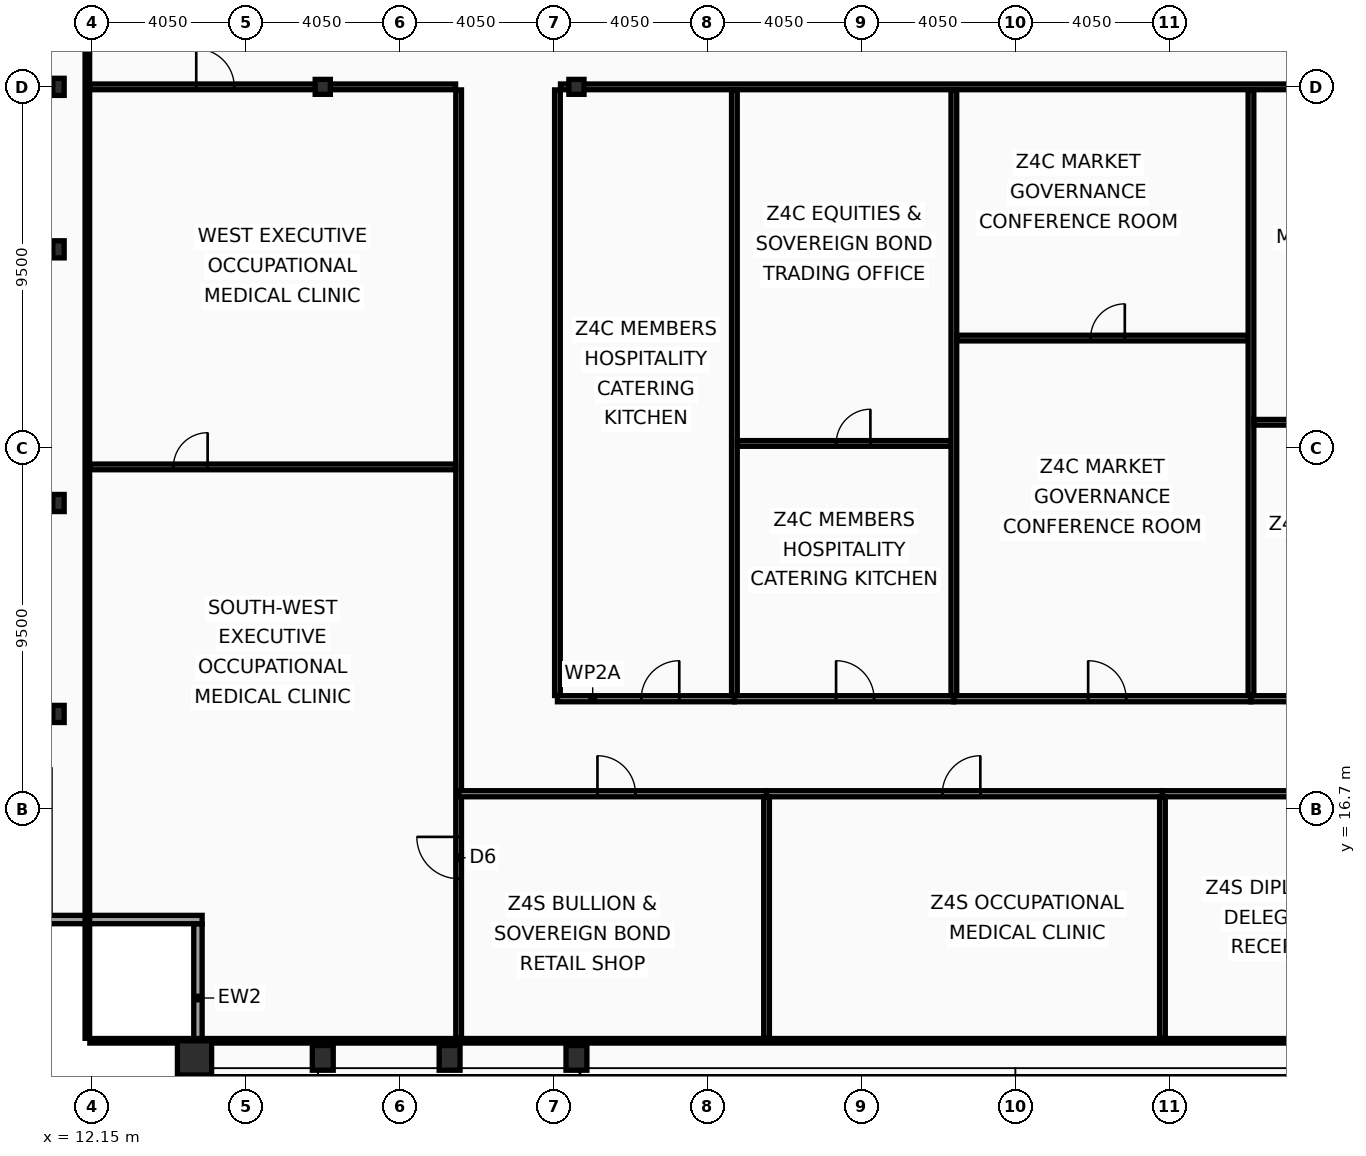
"""IFC4 building model, lengths in metres.
Left out: names, types, materials, properties, quantities, classifications, styles, units other than length and angle.
Written with IfcOpenShell. Run it as: python <this file> out.ifc"""

import sys

from ifc_helpers import new_model, si_unit, direction, frame, frame_2d, origin, origin_2d, place, context, subcontext, project, spatial, rectangle, hollow_rectangle, i_section, extrude, element, fill, save


model = new_model("IFC4")
c1 = context("Model", 3, precision=1e-05, world=origin(), true_north=direction((0.0, 1.0)))
c2 = subcontext(c1, "Body", "Model", "MODEL_VIEW")
j1 = project(units=[si_unit("LENGTHUNIT", "METRE"), si_unit("PLANEANGLEUNIT", "RADIAN")], contexts=[c1])
p1 = place(None, origin())
s1 = spatial("IfcSite", under=j1, at=p1, CompositionType="ELEMENT")
p2 = place(p1, origin())
s2 = spatial("IfcBuilding", under=s1, at=p2, CompositionType="ELEMENT")
p3 = place(p2, frame((0.0, 0.0, 314.6)))
s3 = spatial("IfcBuildingStorey", under=s2, at=p3, CompositionType="ELEMENT", Elevation=314.6)
p4 = place(p3, frame((14.85, 10.15, 0.0), z_axis=(0.0, 0.0, 1.0), x_axis=(1.0, 0.0, 0.0)))
e1 = element("IfcColumn", 1, at=p4, inside=s3, PredefinedType="COLUMN", context=c2, shape_type="SweptSolid", body=[
    extrude(hollow_rectangle(XDim=0.9, YDim=0.9, WallThickness=0.05, at=origin_2d()), origin(), (0.0, 0.0, 1.0), 3.6),
])
for number, where, z_axis, x_axis in (
    (2, (18.225, 10.15, 0.0), (0.0, 0.0, 1.0), (1.0, 0.0, 0.0)),
    (3, (21.562, 10.15, 0.0), (0.0, 0.0, 1.0), (1.0, 0.0, 0.0)),
    (4, (24.9, 10.15, 0.0), (0.0, 0.0, 1.0), (1.0, 0.0, 0.0)),
):
    element("IfcColumn", number, at=place(p3, frame(where, z_axis=z_axis, x_axis=x_axis)), inside=s3, PredefinedType="COLUMN", context=c2, shape_type="SweptSolid", body=[
        extrude(hollow_rectangle(XDim=0.55, YDim=0.65, WallThickness=0.04, at=origin_2d()), origin(), (0.0, 0.0, 1.0), 3.6),
    ])
for number, where, z_axis, x_axis in (
    (5, (11.27, 19.2, 0.0), (0.0, 0.0, 1.0), (1.0, 0.0, 0.0)),
    (6, (11.27, 24.75, 0.0), (0.0, 0.0, 1.0), (1.0, 0.0, 0.0)),
    (7, (11.27, 31.425, 0.0), (0.0, 0.0, 1.0), (1.0, 0.0, 0.0)),
    (8, (11.27, 35.7, 0.0), (0.0, 0.0, 1.0), (1.0, 0.0, 0.0)),
):
    element("IfcColumn", number, at=place(p3, frame(where, z_axis=z_axis, x_axis=x_axis)), inside=s3, PredefinedType="COLUMN", context=c2, shape_type="SweptSolid", body=[
        extrude(i_section(OverallWidth=0.3, OverallDepth=0.45, WebThickness=0.014, FlangeThickness=0.026, at=origin_2d()), origin(), (0.0, 0.0, 1.0), 3.6),
    ])
for number, where, z_axis, x_axis in (
    (9, (18.225, 35.7, 0.0), (0.0, 0.0, 1.0), (1.0, 0.0, 0.0)),
    (10, (24.9, 35.7, 0.0), (0.0, 0.0, 1.0), (1.0, 0.0, 0.0)),
):
    element("IfcColumn", number, at=place(p3, frame(where, z_axis=z_axis, x_axis=x_axis)), inside=s3, PredefinedType="COLUMN", context=c2, shape_type="SweptSolid", body=[
        extrude(i_section(OverallWidth=0.399, OverallDepth=0.393, WebThickness=0.023, FlangeThickness=0.037, at=origin_2d()), origin(), (0.0, 0.0, 1.0), 3.6),
    ])
p5 = place(p3, frame((14.94, 9.77, 0.0), z_axis=(0.0, 0.0, 1.0), x_axis=(0.0, 1.0, 0.0)))
e11 = element("IfcWall", 11, at=p5, inside=s3, PredefinedType="SOLIDWALL", context=c2, shape_type="SweptSolid", body=[
    extrude(rectangle(XDim=3.91, YDim=0.22, at=frame_2d((1.955, 0.0))), origin(), (0.0, 0.0, 1.0), 2.88),
])
p6 = place(p3, frame((15.05, 13.79, 0.0), z_axis=(0.0, 0.0, 1.0), x_axis=(-1.0, 0.0, 0.0)))
e12 = element("IfcWall", 12, at=p6, inside=s3, PredefinedType="SOLIDWALL", context=c2, shape_type="SweptSolid", body=[
    extrude(rectangle(XDim=4.22, YDim=0.22, at=frame_2d((2.11, 0.0))), origin(), (0.0, 0.0, 1.0), 2.88),
])
p7 = place(p3, frame((21.8, 10.665, 0.0), z_axis=(0.0, 0.0, 1.0), x_axis=(0.0, 1.0, 0.0)))
e13 = element("IfcWall", 13, at=p7, inside=s3, PredefinedType="PARTITIONING", context=c2, shape_type="SweptSolid", body=[
    extrude(rectangle(XDim=24.955, YDim=0.15, at=frame_2d((12.478, 0.0))), origin(), (0.0, 0.0, 1.0), 3.07),
])
p8 = place(p7, frame((4.2, 0.0, 0.0)))
e14 = element("IfcOpeningElement", 14, at=p8, cuts=e13, PredefinedType="OPENING", context=c2, shape_type="SweptSolid", body=[
    extrude(rectangle(XDim=1.1, YDim=2.1, at=frame_2d((0.55, 1.05))), frame((0.0, 0.085, 0.0), z_axis=(0.0, -1.0, 0.0), x_axis=(1.0, 0.0, 0.0)), (0.0, 0.0, 1.0), 0.17),
])
p9 = place(p3, frame((12.095, 35.7, 0.0), z_axis=(0.0, 0.0, 1.0), x_axis=(1.0, 0.0, 0.0)))
e15 = element("IfcWall", 15, at=p9, inside=s3, PredefinedType="PARTITIONING", context=c2, shape_type="SweptSolid", body=[
    extrude(rectangle(XDim=9.625, YDim=0.15, at=frame_2d((4.812, 0.0))), origin(), (0.0, 0.0, 1.0), 2.83),
])
p10 = place(p9, frame((2.8, 0.0, 0.0)))
e16 = element("IfcOpeningElement", 16, at=p10, cuts=e15, PredefinedType="OPENING", context=c2, shape_type="SweptSolid", body=[
    extrude(rectangle(XDim=1.0, YDim=2.05, at=frame_2d((0.5, 1.025))), frame((0.0, 0.085, 0.0), z_axis=(0.0, -1.0, 0.0), x_axis=(1.0, 0.0, 0.0)), (0.0, 0.0, 1.0), 0.17),
])
p11 = place(p3, frame((12.095, 25.7, 0.0), z_axis=(0.0, 0.0, 1.0), x_axis=(1.0, 0.0, 0.0)))
e17 = element("IfcWall", 17, at=p11, inside=s3, PredefinedType="PARTITIONING", context=c2, shape_type="SweptSolid", body=[
    extrude(rectangle(XDim=9.625, YDim=0.15, at=frame_2d((4.812, 0.0))), origin(), (0.0, 0.0, 1.0), 2.83),
])
p12 = place(p11, frame((2.2, 0.0, 0.0)))
e18 = element("IfcOpeningElement", 18, at=p12, cuts=e17, PredefinedType="OPENING", context=c2, shape_type="SweptSolid", body=[
    extrude(rectangle(XDim=0.9, YDim=2.05, at=frame_2d((0.45, 1.025))), frame((0.0, 0.085, 0.0), z_axis=(0.0, -1.0, 0.0), x_axis=(1.0, 0.0, 0.0)), (0.0, 0.0, 1.0), 0.17),
])
p13 = place(p3, frame((24.4, 19.685, 0.0), z_axis=(0.0, 0.0, 1.0), x_axis=(0.0, 1.0, 0.0)))
e19 = element("IfcWall", 19, at=p13, inside=s3, PredefinedType="PARTITIONING", context=c2, shape_type="SweptSolid", body=[
    extrude(rectangle(XDim=15.935, YDim=0.15, at=frame_2d((7.968, 0.0))), origin(), (0.0, 0.0, 1.0), 2.83),
])
p14 = place(p3, frame((24.48, 35.7, 0.0), z_axis=(0.0, 0.0, 1.0), x_axis=(1.0, 0.0, 0.0)))
e20 = element("IfcWall", 20, at=p14, inside=s3, PredefinedType="PARTITIONING", context=c2, shape_type="SweptSolid", body=[
    extrude(rectangle(XDim=25.02, YDim=0.15, at=frame_2d((12.51, 0.0))), origin(), (0.0, 0.0, 1.0), 2.83),
])
p15 = place(p3, frame((24.4, 19.6, 0.0), z_axis=(0.0, 0.0, 1.0), x_axis=(1.0, 0.0, 0.0)))
e21 = element("IfcWall", 21, at=p15, inside=s3, PredefinedType="PARTITIONING", context=c2, shape_type="SweptSolid", body=[
    extrude(rectangle(XDim=4.656, YDim=0.16, at=frame_2d((2.328, 0.0))), origin(), (0.0, 0.0, 1.0), 2.83),
])
p16 = place(p15, frame((2.206, 0.0, 0.0)))
e22 = element("IfcOpeningElement", 22, at=p16, cuts=e21, PredefinedType="OPENING", context=c2, shape_type="SweptSolid", body=[
    extrude(rectangle(XDim=1.0, YDim=2.05, at=frame_2d((0.5, 1.025))), frame((0.0, 0.09, 0.0), z_axis=(0.0, -1.0, 0.0), x_axis=(1.0, 0.0, 0.0)), (0.0, 0.0, 1.0), 0.18),
])
p17 = place(p3, frame((29.056, 19.6, 0.0), z_axis=(0.0, 0.0, 1.0), x_axis=(1.0, 0.0, 0.0)))
e23 = element("IfcWall", 23, at=p17, inside=s3, PredefinedType="PARTITIONING", context=c2, shape_type="SweptSolid", body=[
    extrude(rectangle(XDim=5.775, YDim=0.16, at=frame_2d((2.888, 0.0))), origin(), (0.0, 0.0, 1.0), 3.44),
])
p18 = place(p17, frame((2.676, 0.0, 0.0)))
e24 = element("IfcOpeningElement", 24, at=p18, cuts=e23, PredefinedType="OPENING", context=c2, shape_type="SweptSolid", body=[
    extrude(rectangle(XDim=1.0, YDim=2.05, at=frame_2d((0.5, 1.025))), frame((0.0, 0.09, 0.0), z_axis=(0.0, -1.0, 0.0), x_axis=(1.0, 0.0, 0.0)), (0.0, 0.0, 1.0), 0.18),
])
p19 = place(p3, frame((29.056, 19.685, 0.0), z_axis=(0.0, 0.0, 1.0), x_axis=(0.0, 1.0, 0.0)))
e25 = element("IfcWall", 25, at=p19, inside=s3, PredefinedType="PARTITIONING", context=c2, shape_type="SweptSolid", body=[
    extrude(rectangle(XDim=15.935, YDim=0.15, at=frame_2d((7.968, 0.0))), origin(), (0.0, 0.0, 1.0), 3.07),
])
p20 = place(p3, frame((29.136, 26.317, 0.0), z_axis=(0.0, 0.0, 1.0), x_axis=(1.0, 0.0, 0.0)))
e26 = element("IfcWall", 26, at=p20, inside=s3, PredefinedType="PARTITIONING", context=c2, shape_type="SweptSolid", body=[
    extrude(rectangle(XDim=5.615, YDim=0.15, at=frame_2d((2.808, 0.0))), origin(), (0.0, 0.0, 1.0), 3.44),
])
p21 = place(p20, frame((2.599, 0.0, 0.0)))
e27 = element("IfcOpeningElement", 27, at=p21, cuts=e26, PredefinedType="OPENING", context=c2, shape_type="SweptSolid", body=[
    extrude(rectangle(XDim=0.9, YDim=2.05, at=frame_2d((0.45, 1.025))), frame((0.0, 0.085, 0.0), z_axis=(0.0, -1.0, 0.0), x_axis=(1.0, 0.0, 0.0)), (0.0, 0.0, 1.0), 0.17),
])
p22 = place(p3, frame((34.832, 19.6, 0.0), z_axis=(0.0, 0.0, 1.0), x_axis=(1.0, 0.0, 0.0)))
e28 = element("IfcWall", 28, at=p22, inside=s3, PredefinedType="PARTITIONING", context=c2, shape_type="SweptSolid", body=[
    extrude(rectangle(XDim=7.818, YDim=0.16, at=frame_2d((3.909, 0.0))), origin(), (0.0, 0.0, 1.0), 3.44),
])
p23 = place(p22, frame((3.534, 0.0, 0.0)))
e29 = element("IfcOpeningElement", 29, at=p23, cuts=e28, PredefinedType="OPENING", context=c2, shape_type="SweptSolid", body=[
    extrude(rectangle(XDim=1.0, YDim=2.05, at=frame_2d((0.5, 1.025))), frame((0.0, 0.09, 0.0), z_axis=(0.0, -1.0, 0.0), x_axis=(1.0, 0.0, 0.0)), (0.0, 0.0, 1.0), 0.18),
])
p24 = place(p3, frame((34.832, 19.685, 0.0), z_axis=(0.0, 0.0, 1.0), x_axis=(0.0, 1.0, 0.0)))
e30 = element("IfcWall", 30, at=p24, inside=s3, PredefinedType="PARTITIONING", context=c2, shape_type="SweptSolid", body=[
    extrude(rectangle(XDim=15.935, YDim=0.15, at=frame_2d((7.968, 0.0))), origin(), (0.0, 0.0, 1.0), 3.07),
])
p25 = place(p3, frame((34.912, 29.09, 0.0), z_axis=(0.0, 0.0, 1.0), x_axis=(1.0, 0.0, 0.0)))
e31 = element("IfcWall", 31, at=p25, inside=s3, PredefinedType="PARTITIONING", context=c2, shape_type="SweptSolid", body=[
    extrude(rectangle(XDim=7.658, YDim=0.15, at=frame_2d((3.829, 0.0))), origin(), (0.0, 0.0, 1.0), 3.44),
])
p26 = place(p25, frame((3.518, 0.0, 0.0)))
e32 = element("IfcOpeningElement", 32, at=p26, cuts=e31, PredefinedType="OPENING", context=c2, shape_type="SweptSolid", body=[
    extrude(rectangle(XDim=0.9, YDim=2.05, at=frame_2d((0.45, 1.025))), frame((0.0, 0.085, 0.0), z_axis=(0.0, -1.0, 0.0), x_axis=(1.0, 0.0, 0.0)), (0.0, 0.0, 1.0), 0.17),
])
p27 = place(p3, frame((42.65, 19.6, 0.0), z_axis=(0.0, 0.0, 1.0), x_axis=(1.0, 0.0, 0.0)))
e33 = element("IfcWall", 33, at=p27, inside=s3, PredefinedType="PARTITIONING", context=c2, shape_type="SweptSolid", body=[
    extrude(rectangle(XDim=6.93, YDim=0.16, at=frame_2d((3.465, 0.0))), origin(), (0.0, 0.0, 1.0), 2.83),
])
p28 = place(p27, frame((3.161, 0.0, 0.0)))
e34 = element("IfcOpeningElement", 34, at=p28, cuts=e33, PredefinedType="OPENING", context=c2, shape_type="SweptSolid", body=[
    extrude(rectangle(XDim=1.0, YDim=2.05, at=frame_2d((0.5, 1.025))), frame((0.0, 0.09, 0.0), z_axis=(0.0, -1.0, 0.0), x_axis=(1.0, 0.0, 0.0)), (0.0, 0.0, 1.0), 0.18),
])
p29 = place(p3, frame((42.65, 19.685, 0.0), z_axis=(0.0, 0.0, 1.0), x_axis=(0.0, 1.0, 0.0)))
e35 = element("IfcWall", 35, at=p29, inside=s3, PredefinedType="PARTITIONING", context=c2, shape_type="SweptSolid", body=[
    extrude(rectangle(XDim=15.935, YDim=0.15, at=frame_2d((7.968, 0.0))), origin(), (0.0, 0.0, 1.0), 3.07),
])
p30 = place(p3, frame((42.73, 26.874, 0.0), z_axis=(0.0, 0.0, 1.0), x_axis=(1.0, 0.0, 0.0)))
e36 = element("IfcWall", 36, at=p30, inside=s3, PredefinedType="PARTITIONING", context=c2, shape_type="SweptSolid", body=[
    extrude(rectangle(XDim=6.77, YDim=0.15, at=frame_2d((3.385, 0.0))), origin(), (0.0, 0.0, 1.0), 2.83),
])
p31 = place(p30, frame((3.119, 0.0, 0.0)))
e37 = element("IfcOpeningElement", 37, at=p31, cuts=e36, PredefinedType="OPENING", context=c2, shape_type="SweptSolid", body=[
    extrude(rectangle(XDim=0.9, YDim=2.05, at=frame_2d((0.45, 1.025))), frame((0.0, 0.085, 0.0), z_axis=(0.0, -1.0, 0.0), x_axis=(1.0, 0.0, 0.0)), (0.0, 0.0, 1.0), 0.17),
])
p32 = place(p3, frame((21.8, 17.1, 0.0), z_axis=(0.0, 0.0, 1.0), x_axis=(1.0, 0.0, 0.0)))
e38 = element("IfcWall", 38, at=p32, inside=s3, PredefinedType="PARTITIONING", context=c2, shape_type="SweptSolid", body=[
    extrude(rectangle(XDim=8.103, YDim=0.16, at=frame_2d((4.051, 0.0))), origin(), (0.0, 0.0, 1.0), 2.83),
])
p33 = place(p32, frame((3.653, 0.0, 0.0)))
e39 = element("IfcOpeningElement", 39, at=p33, cuts=e38, PredefinedType="OPENING", context=c2, shape_type="SweptSolid", body=[
    extrude(rectangle(XDim=1.0, YDim=2.05, at=frame_2d((0.5, 1.025))), frame((0.0, 0.09, 0.0), z_axis=(0.0, -1.0, 0.0), x_axis=(1.0, 0.0, 0.0)), (0.0, 0.0, 1.0), 0.18),
])
p34 = place(p3, frame((29.903, 17.1, 0.0), z_axis=(0.0, 0.0, 1.0), x_axis=(1.0, 0.0, 0.0)))
e40 = element("IfcWall", 40, at=p34, inside=s3, PredefinedType="PARTITIONING", context=c2, shape_type="SweptSolid", body=[
    extrude(rectangle(XDim=10.417, YDim=0.16, at=frame_2d((5.209, 0.0))), origin(), (0.0, 0.0, 1.0), 3.44),
])
p35 = place(p34, frame((4.625, 0.0, 0.0)))
e41 = element("IfcOpeningElement", 41, at=p35, cuts=e40, PredefinedType="OPENING", context=c2, shape_type="SweptSolid", body=[
    extrude(rectangle(XDim=1.0, YDim=2.05, at=frame_2d((0.5, 1.025))), frame((0.0, 0.09, 0.0), z_axis=(0.0, -1.0, 0.0), x_axis=(1.0, 0.0, 0.0)), (0.0, 0.0, 1.0), 0.18),
])
p36 = place(p3, frame((29.903, 10.665, 0.0), z_axis=(0.0, 0.0, 1.0), x_axis=(0.0, 1.0, 0.0)))
e42 = element("IfcWall", 42, at=p36, inside=s3, PredefinedType="PARTITIONING", context=c2, shape_type="SweptSolid", body=[
    extrude(rectangle(XDim=6.35, YDim=0.15, at=frame_2d((3.175, 0.0))), origin(), (0.0, 0.0, 1.0), 3.07),
])
p37 = place(p3, frame((40.32, 17.1, 0.0), z_axis=(0.0, 0.0, 1.0), x_axis=(1.0, 0.0, 0.0)))
e43 = element("IfcWall", 43, at=p37, inside=s3, PredefinedType="PARTITIONING", context=c2, shape_type="SweptSolid", body=[
    extrude(rectangle(XDim=9.26, YDim=0.16, at=frame_2d((4.63, 0.0))), origin(), (0.0, 0.0, 1.0), 2.83),
])
p38 = place(p37, frame((4.139, 0.0, 0.0)))
e44 = element("IfcOpeningElement", 44, at=p38, cuts=e43, PredefinedType="OPENING", context=c2, shape_type="SweptSolid", body=[
    extrude(rectangle(XDim=1.0, YDim=2.05, at=frame_2d((0.5, 1.025))), frame((0.0, 0.09, 0.0), z_axis=(0.0, -1.0, 0.0), x_axis=(1.0, 0.0, 0.0)), (0.0, 0.0, 1.0), 0.18),
])
p39 = place(p3, frame((40.32, 10.665, 0.0), z_axis=(0.0, 0.0, 1.0), x_axis=(0.0, 1.0, 0.0)))
e45 = element("IfcWall", 45, at=p39, inside=s3, PredefinedType="PARTITIONING", context=c2, shape_type="SweptSolid", body=[
    extrude(rectangle(XDim=6.35, YDim=0.15, at=frame_2d((3.175, 0.0))), origin(), (0.0, 0.0, 1.0), 3.07),
])
p40 = place(p3, frame((12.03, 10.665, 0.0), z_axis=(0.0, 0.0, 1.0), x_axis=(0.0, 1.0, 0.0)))
e46 = element("IfcWall", 46, at=p40, inside=s3, PredefinedType="PARTITIONING", context=c2, shape_type="SweptSolid", body=[
    extrude(rectangle(XDim=42.11, YDim=0.12, at=frame_2d((21.055, 0.0))), origin(), (0.0, 0.0, 1.0), 2.83),
])
p41 = place(p3, frame((12.095, 10.6, 0.0), z_axis=(0.0, 0.0, 1.0), x_axis=(1.0, 0.0, 0.0)))
e47 = element("IfcWall", 47, at=p41, inside=s3, PredefinedType="PARTITIONING", context=c2, shape_type="SweptSolid", body=[
    extrude(rectangle(XDim=48.71, YDim=0.12, at=frame_2d((24.355, 0.0))), origin(), (0.0, 0.0, 1.0), 2.83),
])
p42 = place(p8, origin())
e48 = element("IfcDoor", 48, at=p42, inside=s3, OperationType="SINGLE_SWING_RIGHT", PredefinedType="DOOR", context=c2, shape_type="SweptSolid", body=[
    extrude(rectangle(XDim=1.1, YDim=2.1, at=frame_2d((0.55, 1.05))), frame((0.0, 0.025, 0.0), z_axis=(0.0, -1.0, 0.0), x_axis=(1.0, 0.0, 0.0)), (0.0, 0.0, 1.0), 0.05),
])
fill(e14, e48)
p43 = place(p10, origin())
e49 = element("IfcDoor", 49, at=p43, inside=s3, OperationType="SINGLE_SWING_LEFT", PredefinedType="DOOR", context=c2, shape_type="SweptSolid", body=[
    extrude(rectangle(XDim=1.0, YDim=2.05, at=frame_2d((0.5, 1.025))), frame((0.0, 0.025, 0.0), z_axis=(0.0, -1.0, 0.0), x_axis=(1.0, 0.0, 0.0)), (0.0, 0.0, 1.0), 0.05),
])
fill(e16, e49)
p44 = place(p12, origin())
e50 = element("IfcDoor", 50, at=p44, inside=s3, OperationType="SINGLE_SWING_RIGHT", PredefinedType="DOOR", context=c2, shape_type="SweptSolid", body=[
    extrude(rectangle(XDim=0.9, YDim=2.05, at=frame_2d((0.45, 1.025))), frame((0.0, 0.025, 0.0), z_axis=(0.0, -1.0, 0.0), x_axis=(1.0, 0.0, 0.0)), (0.0, 0.0, 1.0), 0.05),
])
fill(e18, e50)
p45 = place(p16, origin())
e51 = element("IfcDoor", 51, at=p45, inside=s3, OperationType="SINGLE_SWING_RIGHT", PredefinedType="DOOR", context=c2, shape_type="SweptSolid", body=[
    extrude(rectangle(XDim=1.0, YDim=2.05, at=frame_2d((0.5, 1.025))), frame((0.0, 0.025, 0.0), z_axis=(0.0, -1.0, 0.0), x_axis=(1.0, 0.0, 0.0)), (0.0, 0.0, 1.0), 0.05),
])
fill(e22, e51)
p46 = place(p18, origin())
e52 = element("IfcDoor", 52, at=p46, inside=s3, OperationType="SINGLE_SWING_LEFT", PredefinedType="DOOR", context=c2, shape_type="SweptSolid", body=[
    extrude(rectangle(XDim=1.0, YDim=2.05, at=frame_2d((0.5, 1.025))), frame((0.0, 0.025, 0.0), z_axis=(0.0, -1.0, 0.0), x_axis=(1.0, 0.0, 0.0)), (0.0, 0.0, 1.0), 0.05),
])
fill(e24, e52)
p47 = place(p21, origin())
e53 = element("IfcDoor", 53, at=p47, inside=s3, OperationType="SINGLE_SWING_RIGHT", PredefinedType="DOOR", context=c2, shape_type="SweptSolid", body=[
    extrude(rectangle(XDim=0.9, YDim=2.05, at=frame_2d((0.45, 1.025))), frame((0.0, 0.025, 0.0), z_axis=(0.0, -1.0, 0.0), x_axis=(1.0, 0.0, 0.0)), (0.0, 0.0, 1.0), 0.05),
])
fill(e27, e53)
p48 = place(p23, origin())
e54 = element("IfcDoor", 54, at=p48, inside=s3, OperationType="SINGLE_SWING_LEFT", PredefinedType="DOOR", context=c2, shape_type="SweptSolid", body=[
    extrude(rectangle(XDim=1.0, YDim=2.05, at=frame_2d((0.5, 1.025))), frame((0.0, 0.025, 0.0), z_axis=(0.0, -1.0, 0.0), x_axis=(1.0, 0.0, 0.0)), (0.0, 0.0, 1.0), 0.05),
])
fill(e29, e54)
p49 = place(p26, origin())
e55 = element("IfcDoor", 55, at=p49, inside=s3, OperationType="SINGLE_SWING_RIGHT", PredefinedType="DOOR", context=c2, shape_type="SweptSolid", body=[
    extrude(rectangle(XDim=0.9, YDim=2.05, at=frame_2d((0.45, 1.025))), frame((0.0, 0.025, 0.0), z_axis=(0.0, -1.0, 0.0), x_axis=(1.0, 0.0, 0.0)), (0.0, 0.0, 1.0), 0.05),
])
fill(e32, e55)
p50 = place(p33, origin())
e56 = element("IfcDoor", 56, at=p50, inside=s3, OperationType="SINGLE_SWING_LEFT", PredefinedType="DOOR", context=c2, shape_type="SweptSolid", body=[
    extrude(rectangle(XDim=1.0, YDim=2.05, at=frame_2d((0.5, 1.025))), frame((0.0, 0.025, 0.0), z_axis=(0.0, -1.0, 0.0), x_axis=(1.0, 0.0, 0.0)), (0.0, 0.0, 1.0), 0.05),
])
fill(e39, e56)
p51 = place(p35, origin())
e57 = element("IfcDoor", 57, at=p51, inside=s3, OperationType="SINGLE_SWING_RIGHT", PredefinedType="DOOR", context=c2, shape_type="SweptSolid", body=[
    extrude(rectangle(XDim=1.0, YDim=2.05, at=frame_2d((0.5, 1.025))), frame((0.0, 0.025, 0.0), z_axis=(0.0, -1.0, 0.0), x_axis=(1.0, 0.0, 0.0)), (0.0, 0.0, 1.0), 0.05),
])
fill(e41, e57)
save(model, sys.argv[1])
